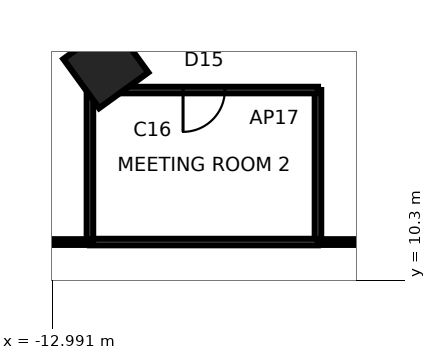
"""IFC4 building model, lengths in metres.
Left out: names, types, materials, properties, quantities, classifications, styles, units other than length and angle.
Written with IfcOpenShell. Run it as: python <this file> out.ifc"""

import sys

from ifc_helpers import new_model, si_unit, direction, frame, frame_2d, origin, origin_2d, place, context, subcontext, project, spatial, rectangle, extrude, element, fill, save


model = new_model("IFC4")
c1 = context("Model", 3, precision=1e-05, world=origin(), true_north=direction((0.0, 1.0)))
c2 = subcontext(c1, "Body", "Model", "MODEL_VIEW")
j1 = project(units=[si_unit("LENGTHUNIT", "METRE"), si_unit("PLANEANGLEUNIT", "RADIAN")], contexts=[c1])
p1 = place(None, origin())
s1 = spatial("IfcSite", under=j1, at=p1, CompositionType="ELEMENT")
p2 = place(p1, origin())
s2 = spatial("IfcBuilding", under=s1, at=p2, CompositionType="ELEMENT")
p3 = place(p2, frame((0.0, 0.0, 108.0)))
s3 = spatial("IfcBuildingStorey", under=s2, at=p3, CompositionType="ELEMENT", Elevation=108.0)
p4 = place(p3, frame((-11.581, 15.94, 0.0), z_axis=(0.0, 0.0, 1.0), x_axis=(-0.587785252292, 0.809016994375, 0.0)))
e1 = element("IfcColumn", 1, at=p4, inside=s3, PredefinedType="COLUMN", context=c2, shape_type="SweptSolid", body=[
    extrude(rectangle(XDim=1.6, YDim=1.6, at=origin_2d()), origin(), (0.0, 0.0, 1.0), 3.9),
])
p5 = place(p3, frame((3.0, 11.3, 0.0), z_axis=(0.0, 0.0, 1.0), x_axis=(-1.0, 0.0, 0.0)))
e2 = element("IfcWall", 2, at=p5, inside=s3, PredefinedType="PARTITIONING", context=c2, shape_type="SweptSolid", body=[
    extrude(rectangle(XDim=9.0, YDim=0.15, at=frame_2d((4.5, 0.0))), origin(), (0.0, 0.0, 1.0), 3.74),
])
p6 = place(p3, frame((-6.0, 11.3, 0.0), z_axis=(0.0, 0.0, 1.0), x_axis=(0.0, 1.0, 0.0)))
e3 = element("IfcWall", 3, at=p6, inside=s3, PredefinedType="PARTITIONING", context=c2, shape_type="SweptSolid", body=[
    extrude(rectangle(XDim=4.0, YDim=0.17, at=frame_2d((2.0, 0.0))), origin(), (0.0, 0.0, 1.0), 3.74),
])
p7 = place(p3, frame((-6.0, 15.3, 0.0), z_axis=(0.0, 0.0, 1.0), x_axis=(-1.0, 0.0, 0.0)))
e4 = element("IfcWall", 4, at=p7, inside=s3, PredefinedType="PARTITIONING", context=c2, shape_type="SweptSolid", body=[
    extrude(rectangle(XDim=6.0, YDim=0.17, at=frame_2d((3.0, 0.0))), origin(), (0.0, 0.0, 1.0), 3.74),
])
p8 = place(p7, frame((2.45, 0.0, 0.0)))
e5 = element("IfcOpeningElement", 5, at=p8, cuts=e4, PredefinedType="OPENING", context=c2, shape_type="SweptSolid", body=[
    extrude(rectangle(XDim=1.1, YDim=2.4, at=frame_2d((0.55, 1.2))), frame((0.0, 0.095, 0.0), z_axis=(0.0, -1.0, 0.0), x_axis=(1.0, 0.0, 0.0)), (0.0, 0.0, 1.0), 0.19),
])
p9 = place(p3, frame((-12.0, 11.3, 0.0), z_axis=(0.0, 0.0, 1.0), x_axis=(1.0, 0.0, 0.0)))
e6 = element("IfcWall", 6, at=p9, inside=s3, PredefinedType="PARTITIONING", context=c2, shape_type="SweptSolid", body=[
    extrude(rectangle(XDim=6.0, YDim=0.17, at=frame_2d((3.0, 0.0))), origin(), (0.0, 0.0, 1.0), 3.74),
])
p10 = place(p3, frame((-12.0, 15.3, 0.0), z_axis=(0.0, 0.0, 1.0), x_axis=(0.0, -1.0, 0.0)))
e7 = element("IfcWall", 7, at=p10, inside=s3, PredefinedType="PARTITIONING", context=c2, shape_type="SweptSolid", body=[
    extrude(rectangle(XDim=4.0, YDim=0.17, at=frame_2d((2.0, 0.0))), origin(), (0.0, 0.0, 1.0), 3.74),
])
p11 = place(p3, frame((-12.0, 11.3, 0.0), z_axis=(0.0, 0.0, 1.0), x_axis=(-1.0, 0.0, 0.0)))
e8 = element("IfcWall", 8, at=p11, inside=s3, PredefinedType="PARTITIONING", context=c2, shape_type="SweptSolid", body=[
    extrude(rectangle(XDim=4.0, YDim=0.15, at=frame_2d((2.0, 0.0))), origin(), (0.0, 0.0, 1.0), 3.74),
])
p12 = place(p8, origin())
e9 = element("IfcDoor", 9, at=p12, inside=s3, OperationType="SINGLE_SWING_RIGHT", PredefinedType="DOOR", context=c2, shape_type="SweptSolid", body=[
    extrude(rectangle(XDim=1.1, YDim=2.4, at=frame_2d((0.55, 1.2))), frame((0.0, 0.025, 0.0), z_axis=(0.0, -1.0, 0.0), x_axis=(1.0, 0.0, 0.0)), (0.0, 0.0, 1.0), 0.05),
])
fill(e5, e9)
save(model, sys.argv[1])
